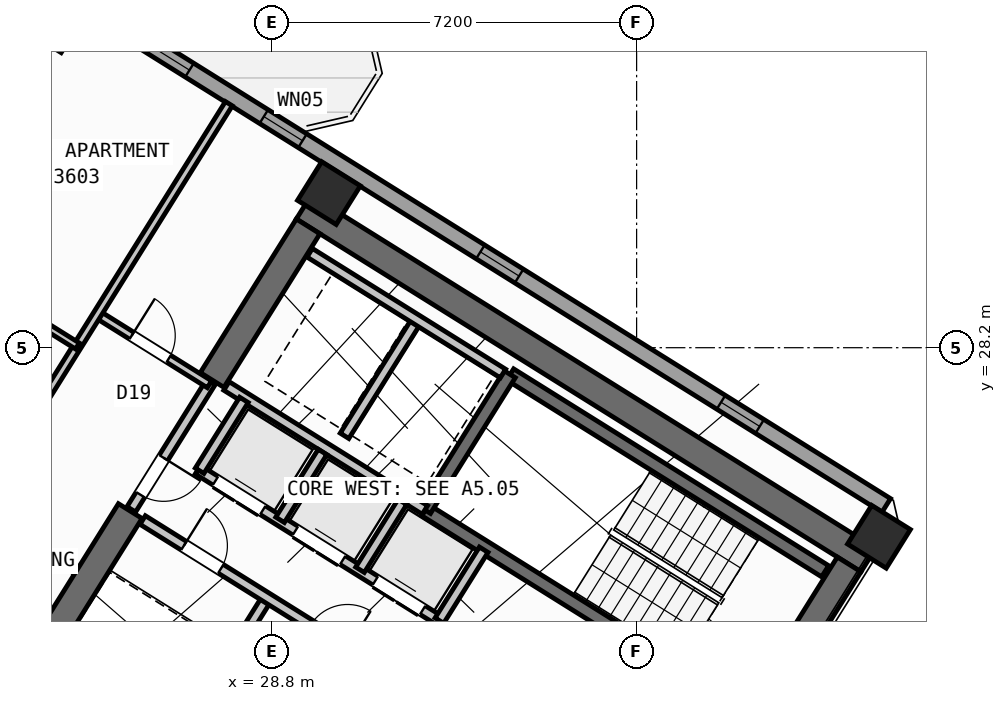
"""IFC4 building model, lengths in metres.
Left out: names, types, materials, properties, quantities, classifications, styles, units other than length and angle.
Written with IfcOpenShell. Run it as: python <this file> out.ifc"""

import sys

from ifc_helpers import new_model, si_unit, direction, frame, frame_2d, origin, origin_2d, place, context, subcontext, project, spatial, rectangle, hollow_rectangle, extrude, source, transform, mapped, element, fill, save


model = new_model("IFC4")
c1 = context("Model", 3, precision=1e-05, world=origin(), true_north=direction((0.0, 1.0)))
c2 = subcontext(c1, "Body", "Model", "MODEL_VIEW")
j1 = project(units=[si_unit("LENGTHUNIT", "METRE"), si_unit("PLANEANGLEUNIT", "RADIAN")], contexts=[c1])
p1 = place(None, origin())
s1 = spatial("IfcSite", under=j1, at=p1, CompositionType="ELEMENT")
p2 = place(p1, origin())
s2 = spatial("IfcBuilding", under=s1, at=p2, CompositionType="ELEMENT")
p3 = place(p2, frame((0.0, 0.0, 144.3)))
s3 = spatial("IfcBuildingStorey", under=s2, at=p3, CompositionType="ELEMENT", Elevation=144.3)
p4 = place(p3, frame((40.573, 24.01, 0.0), z_axis=(0.0, 0.0, 1.0), x_axis=(-0.848047359947, 0.529920442413, 0.0)))
e1 = element("IfcWall", 1, at=p4, inside=s3, PredefinedType="SHEAR", context=c2, shape_type="SweptSolid", body=[
    extrude(rectangle(XDim=13.14, YDim=0.55, at=frame_2d((6.57, 0.0))), origin(), (0.0, 0.0, 1.0), 3.35),
])
p5 = place(p3, frame((40.194, 23.922, 0.0), z_axis=(0.0, 0.0, 1.0), x_axis=(-0.529888438328, -0.848067357541, 0.0)))
e2 = element("IfcWall", 2, at=p5, inside=s3, PredefinedType="SHEAR", context=c2, shape_type="SweptSolid", body=[
    extrude(rectangle(XDim=3.575, YDim=0.55, at=frame_2d((1.788, 0.0))), origin(), (0.0, 0.0, 1.0), 3.35),
])
p6 = place(p3, frame((29.517, 30.594, 0.0), z_axis=(0.0, 0.0, 1.0), x_axis=(-0.529906864564, -0.848055844204, 0.0)))
e3 = element("IfcWall", 3, at=p6, inside=s3, PredefinedType="SHEAR", context=c2, shape_type="SweptSolid", body=[
    extrude(rectangle(XDim=3.575, YDim=0.55, at=frame_2d((1.788, 0.0))), origin(), (0.0, 0.0, 1.0), 3.35),
])
p7 = place(p3, frame((26.007, 24.976, 0.0), z_axis=(0.0, 0.0, 1.0), x_axis=(-0.529923795287, -0.848045264823, 0.0)))
e4 = element("IfcWall", 4, at=p7, inside=s3, PredefinedType="SHEAR", context=c2, shape_type="SweptSolid", body=[
    extrude(rectangle(XDim=6.425, YDim=0.55, at=frame_2d((3.212, 0.0))), origin(), (0.0, 0.0, 1.0), 3.35),
])
m1 = source(origin(), c2, "Body", "SweptSolid", [
    extrude(hollow_rectangle(XDim=0.9, YDim=0.9, WallThickness=0.036, at=origin_2d()), origin(), (0.0, 0.0, 1.0), 3.6),
])
for number, where, z_axis, x_axis in (
    (5, (40.783, 24.469, 0.0), (0.0, 0.0, 1.0), (-0.848, 0.53, 0.0)),
    (6, (29.928, 31.251, 0.0), (0.0, 0.0, 1.0), (-0.848, 0.53, 0.0)),
    (7, (24.5, 34.643, 0.0), (0.0, 0.0, 1.0), (-0.848, 0.53, 0.0)),
):
    element("IfcColumn", number, at=place(p3, frame(where, z_axis=z_axis, x_axis=x_axis)), inside=s3, PredefinedType="COLUMN", context=c2, shape_type="MappedRepresentation", body=[
        mapped(m1, transform((0.0, 0.0, 0.0), scale=1.0)),
    ])
p8 = place(p3, frame((29.268, 6.429, 0.0), z_axis=(0.0, 0.0, 1.0), x_axis=(-0.848049971435, 0.529916263149, 0.0)))
e8 = element("IfcWall", 8, at=p8, inside=s3, PredefinedType="STANDARD", context=c2, shape_type="SweptSolid", body=[
    extrude(rectangle(XDim=31.588, YDim=0.32, at=frame_2d((15.794, 0.0))), origin(), (0.0, 0.0, 1.0), 3.35),
])
p9 = place(p8, frame((16.362, 0.0, 0.0)))
e9 = element("IfcOpeningElement", 9, at=p9, cuts=e8, PredefinedType="OPENING", context=c2, shape_type="SweptSolid", body=[
    extrude(rectangle(XDim=1.2, YDim=2.15, at=frame_2d((0.6, 1.075))), frame((0.0, 0.17, 0.0), z_axis=(0.0, -1.0, 0.0), x_axis=(1.0, 0.0, 0.0)), (0.0, 0.0, 1.0), 0.34),
])
p10 = place(p8, frame((2.989, 0.0, 0.8)))
e10 = element("IfcOpeningElement", 10, at=p10, cuts=e8, PredefinedType="OPENING", context=c2, shape_type="SweptSolid", body=[
    extrude(rectangle(XDim=2.1, YDim=1.55, at=frame_2d((1.05, 0.775))), frame((0.0, 0.17, 0.0), z_axis=(0.0, -1.0, 0.0), x_axis=(1.0, 0.0, 0.0)), (0.0, 0.0, 1.0), 0.34),
])
p11 = place(p8, frame((8.359, 0.0, 0.8)))
e11 = element("IfcOpeningElement", 11, at=p11, cuts=e8, PredefinedType="OPENING", context=c2, shape_type="SweptSolid", body=[
    extrude(rectangle(XDim=2.1, YDim=1.55, at=frame_2d((1.05, 0.775))), frame((0.0, 0.17, 0.0), z_axis=(0.0, -1.0, 0.0), x_axis=(1.0, 0.0, 0.0)), (0.0, 0.0, 1.0), 0.34),
])
p12 = place(p8, frame((13.284, 0.0, 0.95)))
e12 = element("IfcOpeningElement", 12, at=p12, cuts=e8, PredefinedType="OPENING", context=c2, shape_type="SweptSolid", body=[
    extrude(rectangle(XDim=1.2, YDim=1.4, at=frame_2d((0.6, 0.7))), frame((0.0, 0.17, 0.0), z_axis=(0.0, -1.0, 0.0), x_axis=(1.0, 0.0, 0.0)), (0.0, 0.0, 1.0), 0.34),
])
p13 = place(p8, frame((29.188, 0.0, 0.95)))
e13 = element("IfcOpeningElement", 13, at=p13, cuts=e8, PredefinedType="OPENING", context=c2, shape_type="SweptSolid", body=[
    extrude(rectangle(XDim=1.2, YDim=1.4, at=frame_2d((0.6, 0.7))), frame((0.0, 0.17, 0.0), z_axis=(0.0, -1.0, 0.0), x_axis=(1.0, 0.0, 0.0)), (0.0, 0.0, 1.0), 0.34),
])
p14 = place(p8, frame((19.674, 0.0, 1.0)))
e14 = element("IfcOpeningElement", 14, at=p14, cuts=e8, PredefinedType="OPENING", context=c2, shape_type="SweptSolid", body=[
    extrude(rectangle(XDim=0.9, YDim=1.25, at=frame_2d((0.45, 0.625))), frame((0.0, 0.17, 0.0), z_axis=(0.0, -1.0, 0.0), x_axis=(1.0, 0.0, 0.0)), (0.0, 0.0, 1.0), 0.34),
])
p15 = place(p8, frame((21.896, 0.0, 1.0)))
e15 = element("IfcOpeningElement", 15, at=p15, cuts=e8, PredefinedType="OPENING", context=c2, shape_type="SweptSolid", body=[
    extrude(rectangle(XDim=0.9, YDim=1.25, at=frame_2d((0.45, 0.625))), frame((0.0, 0.17, 0.0), z_axis=(0.0, -1.0, 0.0), x_axis=(1.0, 0.0, 0.0)), (0.0, 0.0, 1.0), 0.34),
])
p16 = place(p8, frame((24.106, 0.0, 1.0)))
e16 = element("IfcOpeningElement", 16, at=p16, cuts=e8, PredefinedType="OPENING", context=c2, shape_type="SweptSolid", body=[
    extrude(rectangle(XDim=0.65, YDim=1.15, at=frame_2d((0.325, 0.575))), frame((0.0, 0.17, 0.0), z_axis=(0.0, -1.0, 0.0), x_axis=(1.0, 0.0, 0.0)), (0.0, 0.0, 1.0), 0.34),
])
p17 = place(p8, frame((26.366, 0.0, 1.0)))
e17 = element("IfcOpeningElement", 17, at=p17, cuts=e8, PredefinedType="OPENING", context=c2, shape_type="SweptSolid", body=[
    extrude(rectangle(XDim=0.9, YDim=1.25, at=frame_2d((0.45, 0.625))), frame((0.0, 0.17, 0.0), z_axis=(0.0, -1.0, 0.0), x_axis=(1.0, 0.0, 0.0)), (0.0, 0.0, 1.0), 0.34),
])
p18 = place(p3, frame((14.138, 41.825, 0.0), z_axis=(0.0, 0.0, 1.0), x_axis=(0.848046498049, -0.529921821731, 0.0)))
e18 = element("IfcWall", 18, at=p18, inside=s3, PredefinedType="STANDARD", context=c2, shape_type="SweptSolid", body=[
    extrude(rectangle(XDim=31.588, YDim=0.32, at=frame_2d((15.794, 0.0))), origin(), (0.0, 0.0, 1.0), 3.35),
])
p19 = place(p18, frame((2.949, 0.0, 0.0)))
e19 = element("IfcOpeningElement", 19, at=p19, cuts=e18, PredefinedType="OPENING", context=c2, shape_type="SweptSolid", body=[
    extrude(rectangle(XDim=1.05, YDim=2.15, at=frame_2d((0.525, 1.075))), frame((0.0, 0.17, 0.0), z_axis=(0.0, -1.0, 0.0), x_axis=(1.0, 0.0, 0.0)), (0.0, 0.0, 1.0), 0.34),
])
p20 = place(p18, frame((0.861, 0.0, 0.85)))
e20 = element("IfcOpeningElement", 20, at=p20, cuts=e18, PredefinedType="OPENING", context=c2, shape_type="SweptSolid", body=[
    extrude(rectangle(XDim=1.5, YDim=1.5, at=frame_2d((0.75, 0.75))), frame((0.0, 0.17, 0.0), z_axis=(0.0, -1.0, 0.0), x_axis=(1.0, 0.0, 0.0)), (0.0, 0.0, 1.0), 0.34),
])
p21 = place(p18, frame((8.494, 0.0, 0.85)))
e21 = element("IfcOpeningElement", 21, at=p21, cuts=e18, PredefinedType="OPENING", context=c2, shape_type="SweptSolid", body=[
    extrude(rectangle(XDim=1.8, YDim=1.5, at=frame_2d((0.9, 0.75))), frame((0.0, 0.17, 0.0), z_axis=(0.0, -1.0, 0.0), x_axis=(1.0, 0.0, 0.0)), (0.0, 0.0, 1.0), 0.34),
])
p22 = place(p18, frame((13.874, 0.0, 0.85)))
e22 = element("IfcOpeningElement", 22, at=p22, cuts=e18, PredefinedType="OPENING", context=c2, shape_type="SweptSolid", body=[
    extrude(rectangle(XDim=1.5, YDim=1.5, at=frame_2d((0.75, 0.75))), frame((0.0, 0.17, 0.0), z_axis=(0.0, -1.0, 0.0), x_axis=(1.0, 0.0, 0.0)), (0.0, 0.0, 1.0), 0.34),
])
p23 = place(p18, frame((17.104, 0.0, 1.0)))
e23 = element("IfcOpeningElement", 23, at=p23, cuts=e18, PredefinedType="OPENING", context=c2, shape_type="SweptSolid", body=[
    extrude(rectangle(XDim=0.9, YDim=1.25, at=frame_2d((0.45, 0.625))), frame((0.0, 0.17, 0.0), z_axis=(0.0, -1.0, 0.0), x_axis=(1.0, 0.0, 0.0)), (0.0, 0.0, 1.0), 0.34),
])
p24 = place(p18, frame((22.144, 0.0, 1.0)))
e24 = element("IfcOpeningElement", 24, at=p24, cuts=e18, PredefinedType="OPENING", context=c2, shape_type="SweptSolid", body=[
    extrude(rectangle(XDim=0.9, YDim=1.25, at=frame_2d((0.45, 0.625))), frame((0.0, 0.17, 0.0), z_axis=(0.0, -1.0, 0.0), x_axis=(1.0, 0.0, 0.0)), (0.0, 0.0, 1.0), 0.34),
])
p25 = place(p18, frame((27.744, 0.0, 1.0)))
e25 = element("IfcOpeningElement", 25, at=p25, cuts=e18, PredefinedType="OPENING", context=c2, shape_type="SweptSolid", body=[
    extrude(rectangle(XDim=0.9, YDim=1.25, at=frame_2d((0.45, 0.625))), frame((0.0, 0.17, 0.0), z_axis=(0.0, -1.0, 0.0), x_axis=(1.0, 0.0, 0.0)), (0.0, 0.0, 1.0), 0.34),
])
p26 = place(p3, frame((39.721, 23.788, 0.0), z_axis=(0.0, 0.0, 1.0), x_axis=(-0.848054434086, 0.529909121291, 0.0)))
e26 = element("IfcWall", 26, at=p26, inside=s3, PredefinedType="SHEAR", context=c2, shape_type="SweptSolid", body=[
    extrude(rectangle(XDim=7.33, YDim=0.26, at=frame_2d((3.665, 0.0))), origin(), (0.0, 0.0, 1.0), 3.35),
])
p27 = place(p3, frame((38.046, 21.108, 0.0), z_axis=(0.0, 0.0, 1.0), x_axis=(-0.848054434086, 0.529909121291, 0.0)))
e27 = element("IfcWall", 27, at=p27, inside=s3, PredefinedType="SHEAR", context=c2, shape_type="SweptSolid", body=[
    extrude(rectangle(XDim=7.33, YDim=0.26, at=frame_2d((3.665, 0.0))), origin(), (0.0, 0.0, 1.0), 3.35),
])
p28 = place(p27, frame((0.22, 0.0, 0.0)))
e28 = element("IfcOpeningElement", 28, at=p28, cuts=e27, PredefinedType="OPENING", context=c2, shape_type="SweptSolid", body=[
    extrude(rectangle(XDim=1.1, YDim=2.1, at=frame_2d((0.55, 1.05))), frame((0.0, 0.14, 0.0), z_axis=(0.0, -1.0, 0.0), x_axis=(1.0, 0.0, 0.0)), (0.0, 0.0, 1.0), 0.28),
])
p29 = place(p3, frame((33.496, 27.677, 0.0), z_axis=(0.0, 0.0, 1.0), x_axis=(-0.529908658664, -0.84805472316, 0.0)))
e29 = element("IfcWall", 29, at=p29, inside=s3, PredefinedType="SHEAR", context=c2, shape_type="SweptSolid", body=[
    extrude(rectangle(XDim=3.16, YDim=0.26, at=frame_2d((1.58, 0.0))), origin(), (0.0, 0.0, 1.0), 3.35),
])
p30 = place(p3, frame((31.822, 24.998, 0.0), z_axis=(0.0, 0.0, 1.0), x_axis=(-0.848036912365, 0.52993716162, 0.0)))
e30 = element("IfcWall", 30, at=p30, inside=s3, PredefinedType="STANDARD", context=c2, shape_type="SweptSolid", body=[
    extrude(rectangle(XDim=4.618, YDim=0.2, at=frame_2d((2.309, 0.0))), origin(), (0.0, 0.0, 1.0), 3.34),
])
p31 = place(p3, frame((32.108, 22.814, 0.0), z_axis=(0.0, 0.0, 1.0), x_axis=(-0.848042229521, 0.529928652696, 0.0)))
e31 = element("IfcWall", 31, at=p31, inside=s3, PredefinedType="STANDARD", context=c2, shape_type="SweptSolid", body=[
    extrude(rectangle(XDim=5.62, YDim=0.2, at=frame_2d((2.81, 0.0))), origin(), (0.0, 0.0, 1.0), 3.34),
])
p32 = place(p31, frame((0.39, 0.0, 0.0)))
e32 = element("IfcOpeningElement", 32, at=p32, cuts=e31, PredefinedType="OPENING", context=c2, shape_type="SweptSolid", body=[
    extrude(rectangle(XDim=1.1, YDim=2.15, at=frame_2d((0.55, 1.075))), frame((0.0, 0.11, 0.0), z_axis=(0.0, -1.0, 0.0), x_axis=(1.0, 0.0, 0.0)), (0.0, 0.0, 1.0), 0.22),
])
p33 = place(p31, frame((2.25, 0.0, 0.0)))
e33 = element("IfcOpeningElement", 33, at=p33, cuts=e31, PredefinedType="OPENING", context=c2, shape_type="SweptSolid", body=[
    extrude(rectangle(XDim=1.1, YDim=2.15, at=frame_2d((0.55, 1.075))), frame((0.0, 0.11, 0.0), z_axis=(0.0, -1.0, 0.0), x_axis=(1.0, 0.0, 0.0)), (0.0, 0.0, 1.0), 0.22),
])
p34 = place(p31, frame((4.11, 0.0, 0.0)))
e34 = element("IfcOpeningElement", 34, at=p34, cuts=e31, PredefinedType="OPENING", context=c2, shape_type="SweptSolid", body=[
    extrude(rectangle(XDim=1.1, YDim=2.15, at=frame_2d((0.55, 1.075))), frame((0.0, 0.11, 0.0), z_axis=(0.0, -1.0, 0.0), x_axis=(1.0, 0.0, 0.0)), (0.0, 0.0, 1.0), 0.22),
])
p35 = place(p3, frame((32.982, 24.213, 0.0), z_axis=(0.0, 0.0, 1.0), x_axis=(-0.529839334948, -0.84809803628, 0.0)))
e35 = element("IfcWall", 35, at=p35, inside=s3, PredefinedType="STANDARD", context=c2, shape_type="SweptSolid", body=[
    extrude(rectangle(XDim=1.65, YDim=0.2, at=frame_2d((0.825, 0.0))), origin(), (0.0, 0.0, 1.0), 3.34),
])
p36 = place(p3, frame((28.25, 27.17, 0.0), z_axis=(0.0, 0.0, 1.0), x_axis=(-0.529905827651, -0.848056492117, 0.0)))
e36 = element("IfcWall", 36, at=p36, inside=s3, PredefinedType="STANDARD", context=c2, shape_type="SweptSolid", body=[
    extrude(rectangle(XDim=1.65, YDim=0.2, at=frame_2d((0.825, 0.0))), origin(), (0.0, 0.0, 1.0), 3.34),
])
p37 = place(p3, frame((31.645, 28.716, 0.0), z_axis=(0.0, 0.0, 1.0), x_axis=(-0.52986693015, -0.848080795876, 0.0)))
e37 = element("IfcWall", 37, at=p37, inside=s3, PredefinedType="STANDARD", context=c2, shape_type="SweptSolid", body=[
    extrude(rectangle(XDim=2.66, YDim=0.2, at=frame_2d((1.33, 0.0))), origin(), (0.0, 0.0, 1.0), 3.34),
])
p38 = place(p3, frame((33.363, 27.69, 0.0), z_axis=(0.0, 0.0, 1.0), x_axis=(-0.848047090064, 0.529920874315, 0.0)))
e38 = element("IfcWall", 38, at=p38, inside=s3, PredefinedType="STANDARD", context=c2, shape_type="SweptSolid", body=[
    extrude(rectangle(XDim=4.498, YDim=0.2, at=frame_2d((2.249, 0.0))), origin(), (0.0, 0.0, 1.0), 3.34),
])
for number, where, z_axis, x_axis in (
    (39, (31.379, 25.156, 0.0), (0.0, 0.0, 1.0), (-0.53, -0.848, 0.0)),
    (40, (29.801, 26.142, 0.0), (0.0, 0.0, 1.0), (-0.53, -0.848, 0.0)),
):
    element("IfcWall", number, at=place(p3, frame(where, z_axis=z_axis, x_axis=x_axis)), inside=s3, PredefinedType="STANDARD", context=c2, shape_type="SweptSolid", body=[
        extrude(rectangle(XDim=1.58, YDim=0.2, at=frame_2d((0.79, 0.0))), origin(), (0.0, 0.0, 1.0), 3.34),
    ])
p39 = place(p3, frame((28.71, 23.263, 0.0), z_axis=(0.0, 0.0, 1.0), x_axis=(-0.529907497854, -0.848055448493, 0.0)))
e41 = element("IfcWall", 41, at=p39, inside=s3, PredefinedType="STANDARD", context=c2, shape_type="SweptSolid", body=[
    extrude(rectangle(XDim=2.88, YDim=0.2, at=frame_2d((1.44, 0.0))), origin(), (0.0, 0.0, 1.0), 3.34),
])
p40 = place(p3, frame((31.525, 21.504, 0.0), z_axis=(0.0, 0.0, 1.0), x_axis=(-0.848040211232, 0.529931882541, 0.0)))
e42 = element("IfcWall", 42, at=p40, inside=s3, PredefinedType="STANDARD", context=c2, shape_type="SweptSolid", body=[
    extrude(rectangle(XDim=6.218, YDim=0.2, at=frame_2d((3.109, 0.0))), origin(), (0.0, 0.0, 1.0), 3.34),
])
p41 = place(p40, frame((4.4, 0.0, 0.0)))
e43 = element("IfcOpeningElement", 43, at=p41, cuts=e42, PredefinedType="OPENING", context=c2, shape_type="SweptSolid", body=[
    extrude(rectangle(XDim=0.86, YDim=2.05, at=frame_2d((0.43, 1.025))), frame((0.0, 0.11, 0.0), z_axis=(0.0, -1.0, 0.0), x_axis=(1.0, 0.0, 0.0)), (0.0, 0.0, 1.0), 0.22),
])
p42 = place(p40, frame((1.45, 0.0, 0.0)))
e44 = element("IfcOpeningElement", 44, at=p42, cuts=e42, PredefinedType="OPENING", context=c2, shape_type="SweptSolid", body=[
    extrude(rectangle(XDim=0.86, YDim=2.05, at=frame_2d((0.43, 1.025))), frame((0.0, 0.11, 0.0), z_axis=(0.0, -1.0, 0.0), x_axis=(1.0, 0.0, 0.0)), (0.0, 0.0, 1.0), 0.22),
])
p43 = place(p3, frame((27.596, 27.52, 0.0), z_axis=(0.0, 0.0, 1.0), x_axis=(-0.529865479138, -0.848081702443, 0.0)))
e45 = element("IfcWall", 45, at=p43, inside=s3, PredefinedType="STANDARD", context=c2, shape_type="SweptSolid", body=[
    extrude(rectangle(XDim=2.96, YDim=0.2, at=frame_2d((1.48, 0.0))), origin(), (0.0, 0.0, 1.0), 3.34),
])
p44 = place(p43, frame((1.76, 0.0, 0.0)))
e46 = element("IfcOpeningElement", 46, at=p44, cuts=e45, PredefinedType="OPENING", context=c2, shape_type="SweptSolid", body=[
    extrude(rectangle(XDim=0.86, YDim=2.05, at=frame_2d((0.43, 1.025))), frame((0.0, 0.11, 0.0), z_axis=(0.0, -1.0, 0.0), x_axis=(1.0, 0.0, 0.0)), (0.0, 0.0, 1.0), 0.22),
])
p45 = place(p3, frame((27.57, 27.478, 0.0), z_axis=(0.0, 0.0, 1.0), x_axis=(-0.848050851465, 0.529914854792, 0.0)))
e47 = element("IfcWall", 47, at=p45, inside=s3, PredefinedType="PARTITIONING", context=c2, shape_type="SweptSolid", body=[
    extrude(rectangle(XDim=2.61, YDim=0.16, at=frame_2d((1.305, 0.0))), origin(), (0.0, 0.0, 1.0), 3.34),
])
p46 = place(p45, frame((0.95, 0.0, 0.0)))
e48 = element("IfcOpeningElement", 48, at=p46, cuts=e47, PredefinedType="OPENING", context=c2, shape_type="SweptSolid", body=[
    extrude(rectangle(XDim=0.86, YDim=2.05, at=frame_2d((0.43, 1.025))), frame((0.0, 0.09, 0.0), z_axis=(0.0, -1.0, 0.0), x_axis=(1.0, 0.0, 0.0)), (0.0, 0.0, 1.0), 0.18),
])
p47 = place(p3, frame((27.953, 33.016, 0.0), z_axis=(0.0, 0.0, 1.0), x_axis=(-0.529903001606, -0.848058257957, 0.0)))
e49 = element("IfcWall", 49, at=p47, inside=s3, PredefinedType="PARTITIONING", context=c2, shape_type="SweptSolid", body=[
    extrude(rectangle(XDim=9.15, YDim=0.16, at=frame_2d((4.575, 0.0))), origin(), (0.0, 0.0, 1.0), 3.34),
])
p48 = place(p3, frame((24.964, 28.233, 0.0), z_axis=(0.0, 0.0, 1.0), x_axis=(-0.848059820872, 0.529900500304, 0.0)))
e50 = element("IfcWall", 50, at=p48, inside=s3, PredefinedType="PLUMBINGWALL", context=c2, shape_type="SweptSolid", body=[
    extrude(rectangle(XDim=3.79, YDim=0.14, at=frame_2d((1.895, 0.0))), origin(), (0.0, 0.0, 1.0), 3.34),
])
p49 = place(p48, frame((2.23, 0.0, 0.0)))
e51 = element("IfcOpeningElement", 51, at=p49, cuts=e50, PredefinedType="OPENING", context=c2, shape_type="SweptSolid", body=[
    extrude(rectangle(XDim=0.92, YDim=2.08, at=frame_2d((0.46, 1.04))), frame((0.0, 0.08, 0.0), z_axis=(0.0, -1.0, 0.0), x_axis=(1.0, 0.0, 0.0)), (0.0, 0.0, 1.0), 0.16),
])
m2 = source(origin(), c2, "Body", "SweptSolid", [
    extrude(rectangle(XDim=1.5, YDim=1.5, at=frame_2d((0.75, 0.75))), frame((0.0, 0.03, 0.0), z_axis=(0.0, -1.0, 0.0), x_axis=(1.0, 0.0, 0.0)), (0.0, 0.0, 1.0), 0.06),
])
p50 = place(p22, origin())
e52 = element("IfcWindow", 52, at=p50, inside=s3, PartitioningType="SINGLE_PANEL", PredefinedType="WINDOW", context=c2, shape_type="MappedRepresentation", body=[
    mapped(m2, transform((0.0, 0.0, 0.0), scale=1.0)),
])
fill(e22, e52)
m3 = source(origin(), c2, "Body", "SweptSolid", [
    extrude(rectangle(XDim=0.9, YDim=1.25, at=frame_2d((0.45, 0.625))), frame((0.0, 0.03, 0.0), z_axis=(0.0, -1.0, 0.0), x_axis=(1.0, 0.0, 0.0)), (0.0, 0.0, 1.0), 0.06),
])
p51 = place(p23, origin())
e53 = element("IfcWindow", 53, at=p51, inside=s3, PartitioningType="SINGLE_PANEL", PredefinedType="WINDOW", context=c2, shape_type="MappedRepresentation", body=[
    mapped(m3, transform((0.0, 0.0, 0.0), scale=1.0)),
])
fill(e23, e53)
p52 = place(p24, origin())
e54 = element("IfcWindow", 54, at=p52, inside=s3, PartitioningType="SINGLE_PANEL", PredefinedType="WINDOW", context=c2, shape_type="MappedRepresentation", body=[
    mapped(m3, transform((0.0, 0.0, 0.0), scale=1.0)),
])
fill(e24, e54)
p53 = place(p25, origin())
e55 = element("IfcWindow", 55, at=p53, inside=s3, PartitioningType="SINGLE_PANEL", PredefinedType="WINDOW", context=c2, shape_type="MappedRepresentation", body=[
    mapped(m3, transform((0.0, 0.0, 0.0), scale=1.0)),
])
fill(e25, e55)
m4 = source(origin(), c2, "Body", "SweptSolid", [
    extrude(rectangle(XDim=1.1, YDim=2.15, at=frame_2d((0.55, 1.075))), frame((0.0, 0.025, 0.0), z_axis=(0.0, -1.0, 0.0), x_axis=(1.0, 0.0, 0.0)), (0.0, 0.0, 1.0), 0.05),
])
p54 = place(p32, origin())
e56 = element("IfcDoor", 56, at=p54, inside=s3, OperationType="DOUBLE_DOOR_SLIDING", PredefinedType="DOOR", context=c2, shape_type="MappedRepresentation", body=[
    mapped(m4, transform((0.0, 0.0, 0.0), scale=1.0)),
])
fill(e32, e56)
p55 = place(p33, origin())
e57 = element("IfcDoor", 57, at=p55, inside=s3, OperationType="DOUBLE_DOOR_SLIDING", PredefinedType="DOOR", context=c2, shape_type="MappedRepresentation", body=[
    mapped(m4, transform((0.0, 0.0, 0.0), scale=1.0)),
])
fill(e33, e57)
p56 = place(p34, origin())
e58 = element("IfcDoor", 58, at=p56, inside=s3, OperationType="DOUBLE_DOOR_SLIDING", PredefinedType="DOOR", context=c2, shape_type="MappedRepresentation", body=[
    mapped(m4, transform((0.0, 0.0, 0.0), scale=1.0)),
])
fill(e34, e58)
m5 = source(origin(), c2, "Body", "SweptSolid", [
    extrude(rectangle(XDim=0.86, YDim=2.05, at=frame_2d((0.43, 1.025))), frame((0.0, 0.025, 0.0), z_axis=(0.0, -1.0, 0.0), x_axis=(1.0, 0.0, 0.0)), (0.0, 0.0, 1.0), 0.05),
])
p57 = place(p41, frame((0.86, 0.0, 0.0), z_axis=(0.0, 0.0, 1.0), x_axis=(-1.0, 0.0, 0.0)))
e59 = element("IfcDoor", 59, at=p57, inside=s3, OperationType="SINGLE_SWING_LEFT", PredefinedType="DOOR", context=c2, shape_type="MappedRepresentation", body=[
    mapped(m5, transform((0.0, 0.0, 0.0), scale=1.0)),
])
fill(e43, e59)
p58 = place(p46, frame((0.86, 0.0, 0.0), z_axis=(0.0, 0.0, 1.0), x_axis=(-1.0, 0.0, 0.0)))
e60 = element("IfcDoor", 60, at=p58, inside=s3, OperationType="SINGLE_SWING_LEFT", PredefinedType="DOOR", context=c2, shape_type="MappedRepresentation", body=[
    mapped(m5, transform((0.0, 0.0, 0.0), scale=1.0)),
])
fill(e48, e60)
p59 = place(p44, origin())
e61 = element("IfcDoor", 61, at=p59, inside=s3, OperationType="SINGLE_SWING_LEFT", PredefinedType="DOOR", context=c2, shape_type="MappedRepresentation", body=[
    mapped(m5, transform((0.0, 0.0, 0.0), scale=1.0)),
])
fill(e46, e61)
save(model, sys.argv[1])
